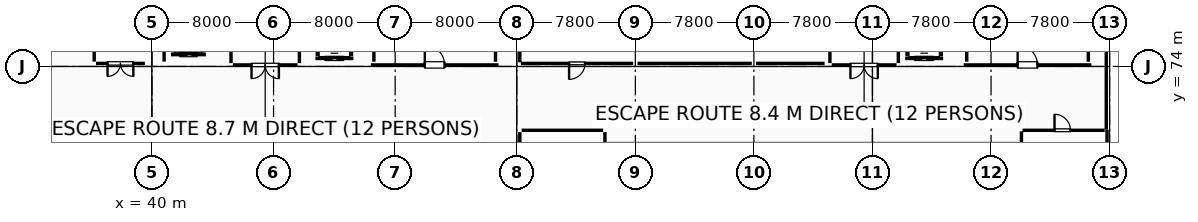
"""IFC4 building model, lengths in metres.
Left out: names, types, materials, properties, quantities, classifications, styles, units other than length and angle.
Written with IfcOpenShell. Run it as: python <this file> out.ifc"""

import sys

from ifc_helpers import new_model, si_unit, direction, frame, frame_2d, origin, origin_2d, place, context, subcontext, project, spatial, rectangle, i_section, extrude, element, fill, save


model = new_model("IFC4")
c1 = context("Model", 3, precision=1e-05, world=origin(), true_north=direction((0.0, 1.0)))
c2 = subcontext(c1, "Body", "Model", "MODEL_VIEW")
j1 = project(units=[si_unit("LENGTHUNIT", "METRE"), si_unit("PLANEANGLEUNIT", "RADIAN")], contexts=[c1])
p1 = place(None, origin())
s1 = spatial("IfcSite", under=j1, at=p1, CompositionType="ELEMENT")
p2 = place(p1, origin())
s2 = spatial("IfcBuilding", under=s1, at=p2, CompositionType="ELEMENT")
p3 = place(p2, frame((0.0, 0.0, 15.0)))
s3 = spatial("IfcBuildingStorey", under=s2, at=p3, CompositionType="ELEMENT", Elevation=15.0)
p4 = place(p3, frame((40.0, 74.0, 0.0), z_axis=(0.0, 0.0, 1.0), x_axis=(1.0, 0.0, 0.0)))
e1 = element("IfcColumn", 1, at=p4, inside=s3, PredefinedType="COLUMN", context=c2, shape_type="SweptSolid", body=[
    extrude(rectangle(XDim=0.9, YDim=0.9, at=origin_2d()), origin(), (0.0, 0.0, 1.0), 4.8),
])
for number, where, z_axis, x_axis in (
    (2, (64.0, 74.0, 0.0), (0.0, 0.0, 1.0), (1.0, 0.0, 0.0)),
    (3, (71.8, 74.0, 0.0), (0.0, 0.0, 1.0), (1.0, 0.0, 0.0)),
    (4, (79.6, 74.0, 0.0), (0.0, 0.0, 1.0), (1.0, 0.0, 0.0)),
    (5, (103.0, 74.0, 0.0), (0.0, 0.0, 1.0), (1.0, 0.0, 0.0)),
):
    element("IfcColumn", number, at=place(p3, frame(where, z_axis=z_axis, x_axis=x_axis)), inside=s3, PredefinedType="COLUMN", context=c2, shape_type="SweptSolid", body=[
        extrude(i_section(OverallWidth=0.25, OverallDepth=0.45, WebThickness=0.011, FlangeThickness=0.014, FilletRadius=0.015, at=origin_2d()), origin(), (0.0, 0.0, 1.0), 4.8),
    ])
p5 = place(p3, frame((102.78, 82.767, 0.0), z_axis=(0.0, 0.0, 1.0), x_axis=(0.0, -1.0, 0.0)))
e6 = element("IfcWall", 6, at=p5, inside=s3, PredefinedType="STANDARD", context=c2, shape_type="SweptSolid", body=[
    extrude(rectangle(XDim=9.0, YDim=0.4, at=frame_2d((4.5, 0.0))), origin(), (0.0, 0.0, 1.0), 3.885),
])
p6 = place(p3, frame((102.78, 73.767, 0.0), z_axis=(0.0, 0.0, 1.0), x_axis=(0.0, -1.0, 0.0)))
e7 = element("IfcWall", 7, at=p6, inside=s3, PredefinedType="STANDARD", context=c2, shape_type="SweptSolid", body=[
    extrude(rectangle(XDim=3.923, YDim=0.4, at=frame_2d((1.961, 0.0))), origin(), (0.0, 0.0, 1.0), 3.785),
])
p7 = place(p3, frame((102.83, 69.84, 0.0), z_axis=(0.0, 0.0, 1.0), x_axis=(0.0, -1.0, 0.0)))
e8 = element("IfcWall", 8, at=p7, inside=s3, PredefinedType="STANDARD", context=c2, shape_type="SweptSolid", body=[
    extrude(rectangle(XDim=5.073, YDim=0.3, at=frame_2d((2.537, 0.0))), origin(), (0.0, 0.0, 1.0), 3.785),
])
p8 = place(p3, frame((39.76, 69.88, 0.0), z_axis=(0.0, 0.0, 1.0), x_axis=(0.0, -1.0, 0.0)))
e9 = element("IfcWall", 9, at=p8, inside=s3, PredefinedType="PARAPET", context=c2, shape_type="SweptSolid", body=[
    extrude(rectangle(XDim=4.42, YDim=0.18, at=frame_2d((2.21, 0.0))), origin(), (0.0, 0.0, 1.0), 0.88),
])
p9 = place(p3, frame((54.4, 74.1, 0.0), z_axis=(0.0, 0.0, 1.0), x_axis=(1.0, 0.0, 0.0)))
e10 = element("IfcWall", 10, at=p9, inside=s3, PredefinedType="SHEAR", context=c2, shape_type="SweptSolid", body=[
    extrude(rectangle(XDim=8.4, YDim=0.4, at=frame_2d((4.2, 0.0))), origin(), (0.0, 0.0, 1.0), 4.55),
])
p10 = place(p9, frame((3.55, 0.0, 0.0)))
e11 = element("IfcOpeningElement", 11, at=p10, cuts=e10, PredefinedType="OPENING", context=c2, shape_type="SweptSolid", body=[
    extrude(rectangle(XDim=1.3, YDim=2.15, at=frame_2d((0.65, 1.075))), frame((0.0, 0.21, 0.0), z_axis=(0.0, -1.0, 0.0), x_axis=(1.0, 0.0, 0.0)), (0.0, 0.0, 1.0), 0.42),
])
for number, where, z_axis, x_axis in (
    (12, (62.6, 74.31, 0.0), (0.0, 0.0, 1.0), (0.0, 1.0, 0.0)),
    (13, (54.6, 82.69, 0.0), (0.0, 0.0, 1.0), (0.0, -1.0, 0.0)),
):
    element("IfcWall", number, at=place(p3, frame(where, z_axis=z_axis, x_axis=x_axis)), inside=s3, PredefinedType="SHEAR", context=c2, shape_type="SweptSolid", body=[
        extrude(rectangle(XDim=8.38, YDim=0.4, at=frame_2d((4.19, 0.0))), origin(), (0.0, 0.0, 1.0), 4.55),
    ])
p11 = place(p3, frame((50.75, 74.525, 0.0), z_axis=(0.0, 0.0, 1.0), x_axis=(1.0, 0.0, 0.0)))
e14 = element("IfcWall", 14, at=p11, inside=s3, PredefinedType="STANDARD", context=c2, shape_type="SweptSolid", body=[
    extrude(rectangle(XDim=2.5, YDim=0.25, at=frame_2d((1.25, 0.0))), origin(), (0.0, 0.0, 1.0), 4.54),
])
p12 = place(p11, frame((0.65, 0.0, 0.0)))
e15 = element("IfcOpeningElement", 15, at=p12, cuts=e14, PredefinedType="OPENING", context=c2, shape_type="SweptSolid", body=[
    extrude(rectangle(XDim=1.2, YDim=2.05, at=frame_2d((0.6, 1.025))), frame((0.0, 0.135, 0.0), z_axis=(0.0, -1.0, 0.0), x_axis=(1.0, 0.0, 0.0)), (0.0, 0.0, 1.0), 0.27),
])
for number, where, z_axis, x_axis in (
    (16, (53.125, 74.66, 0.0), (0.0, 0.0, 1.0), (0.0, 1.0, 0.0)),
    (17, (50.875, 76.94, 0.0), (0.0, 0.0, 1.0), (0.0, -1.0, 0.0)),
):
    element("IfcWall", number, at=place(p3, frame(where, z_axis=z_axis, x_axis=x_axis)), inside=s3, PredefinedType="STANDARD", context=c2, shape_type="SweptSolid", body=[
        extrude(rectangle(XDim=2.28, YDim=0.25, at=frame_2d((1.14, 0.0))), origin(), (0.0, 0.0, 1.0), 4.54),
    ])
p13 = place(p3, frame((41.25, 74.775, 0.0), z_axis=(0.0, 0.0, 1.0), x_axis=(1.0, 0.0, 0.0)))
e18 = element("IfcWall", 18, at=p13, inside=s3, PredefinedType="STANDARD", context=c2, shape_type="SweptSolid", body=[
    extrude(rectangle(XDim=2.3, YDim=0.25, at=frame_2d((1.15, 0.0))), origin(), (0.0, 0.0, 1.0), 4.54),
])
p14 = place(p13, frame((0.6, 0.0, 0.0)))
e19 = element("IfcOpeningElement", 19, at=p14, cuts=e18, PredefinedType="OPENING", context=c2, shape_type="SweptSolid", body=[
    extrude(rectangle(XDim=1.1, YDim=2.15, at=frame_2d((0.55, 1.075))), frame((0.0, 0.135, 0.0), z_axis=(0.0, -1.0, 0.0), x_axis=(1.0, 0.0, 0.0)), (0.0, 0.0, 1.0), 0.27),
])
for number, where, z_axis, x_axis in (
    (20, (43.425, 74.91, 0.0), (0.0, 0.0, 1.0), (0.0, 1.0, 0.0)),
    (21, (41.375, 77.49, 0.0), (0.0, 0.0, 1.0), (0.0, -1.0, 0.0)),
):
    element("IfcWall", number, at=place(p3, frame(where, z_axis=z_axis, x_axis=x_axis)), inside=s3, PredefinedType="STANDARD", context=c2, shape_type="SweptSolid", body=[
        extrude(rectangle(XDim=2.58, YDim=0.25, at=frame_2d((1.29, 0.0))), origin(), (0.0, 0.0, 1.0), 4.54),
    ])
p15 = place(p3, frame((93.4, 74.1, 0.0), z_axis=(0.0, 0.0, 1.0), x_axis=(1.0, 0.0, 0.0)))
e22 = element("IfcWall", 22, at=p15, inside=s3, PredefinedType="SHEAR", context=c2, shape_type="SweptSolid", body=[
    extrude(rectangle(XDim=8.4, YDim=0.4, at=frame_2d((4.2, 0.0))), origin(), (0.0, 0.0, 1.0), 4.55),
])
p16 = place(p15, frame((3.55, 0.0, 0.0)))
e23 = element("IfcOpeningElement", 23, at=p16, cuts=e22, PredefinedType="OPENING", context=c2, shape_type="SweptSolid", body=[
    extrude(rectangle(XDim=1.3, YDim=2.15, at=frame_2d((0.65, 1.075))), frame((0.0, 0.21, 0.0), z_axis=(0.0, -1.0, 0.0), x_axis=(1.0, 0.0, 0.0)), (0.0, 0.0, 1.0), 0.42),
])
for number, where, z_axis, x_axis in (
    (24, (101.6, 74.31, 0.0), (0.0, 0.0, 1.0), (0.0, 1.0, 0.0)),
    (25, (93.6, 82.69, 0.0), (0.0, 0.0, 1.0), (0.0, -1.0, 0.0)),
):
    element("IfcWall", number, at=place(p3, frame(where, z_axis=z_axis, x_axis=x_axis)), inside=s3, PredefinedType="SHEAR", context=c2, shape_type="SweptSolid", body=[
        extrude(rectangle(XDim=8.38, YDim=0.4, at=frame_2d((4.19, 0.0))), origin(), (0.0, 0.0, 1.0), 4.55),
    ])
p17 = place(p3, frame((89.55, 74.525, 0.0), z_axis=(0.0, 0.0, 1.0), x_axis=(1.0, 0.0, 0.0)))
e26 = element("IfcWall", 26, at=p17, inside=s3, PredefinedType="STANDARD", context=c2, shape_type="SweptSolid", body=[
    extrude(rectangle(XDim=2.5, YDim=0.25, at=frame_2d((1.25, 0.0))), origin(), (0.0, 0.0, 1.0), 4.54),
])
p18 = place(p17, frame((0.65, 0.0, 0.0)))
e27 = element("IfcOpeningElement", 27, at=p18, cuts=e26, PredefinedType="OPENING", context=c2, shape_type="SweptSolid", body=[
    extrude(rectangle(XDim=1.2, YDim=2.05, at=frame_2d((0.6, 1.025))), frame((0.0, 0.135, 0.0), z_axis=(0.0, -1.0, 0.0), x_axis=(1.0, 0.0, 0.0)), (0.0, 0.0, 1.0), 0.27),
])
for number, where, z_axis, x_axis in (
    (28, (91.925, 74.66, 0.0), (0.0, 0.0, 1.0), (0.0, 1.0, 0.0)),
    (29, (89.675, 76.94, 0.0), (0.0, 0.0, 1.0), (0.0, -1.0, 0.0)),
):
    element("IfcWall", number, at=place(p3, frame(where, z_axis=z_axis, x_axis=x_axis)), inside=s3, PredefinedType="STANDARD", context=c2, shape_type="SweptSolid", body=[
        extrude(rectangle(XDim=2.28, YDim=0.25, at=frame_2d((1.14, 0.0))), origin(), (0.0, 0.0, 1.0), 4.54),
    ])
for number, where, z_axis, x_axis in (
    (30, (45.2, 74.22, 0.0), (0.0, 0.0, 1.0), (0.0, 1.0, 0.0)),
    (31, (49.7, 77.58, 0.0), (0.0, 0.0, 1.0), (0.0, -1.0, 0.0)),
):
    element("IfcWall", number, at=place(p3, frame(where, z_axis=z_axis, x_axis=x_axis)), inside=s3, PredefinedType="PARTITIONING", context=c2, shape_type="SweptSolid", body=[
        extrude(rectangle(XDim=3.36, YDim=0.2, at=frame_2d((1.68, 0.0))), origin(), (0.0, 0.0, 1.0), 4.54),
    ])
p19 = place(p3, frame((49.58, 74.1, 0.0), z_axis=(0.0, 0.0, 1.0), x_axis=(-1.0, 0.0, 0.0)))
e32 = element("IfcWall", 32, at=p19, inside=s3, PredefinedType="PARTITIONING", context=c2, shape_type="SweptSolid", body=[
    extrude(rectangle(XDim=4.26, YDim=0.2, at=frame_2d((2.13, 0.0))), origin(), (0.0, 0.0, 1.0), 4.54),
])
p20 = place(p19, frame((1.23, 0.0, 0.0)))
e33 = element("IfcOpeningElement", 33, at=p20, cuts=e32, PredefinedType="OPENING", context=c2, shape_type="SweptSolid", body=[
    extrude(rectangle(XDim=1.8, YDim=2.15, at=frame_2d((0.9, 1.075))), frame((0.0, 0.11, 0.0), z_axis=(0.0, -1.0, 0.0), x_axis=(1.0, 0.0, 0.0)), (0.0, 0.0, 1.0), 0.22),
])
for number, where, z_axis, x_axis in (
    (34, (84.6, 74.22, 0.0), (0.0, 0.0, 1.0), (0.0, 1.0, 0.0)),
    (35, (89.1, 77.58, 0.0), (0.0, 0.0, 1.0), (0.0, -1.0, 0.0)),
):
    element("IfcWall", number, at=place(p3, frame(where, z_axis=z_axis, x_axis=x_axis)), inside=s3, PredefinedType="PARTITIONING", context=c2, shape_type="SweptSolid", body=[
        extrude(rectangle(XDim=3.36, YDim=0.2, at=frame_2d((1.68, 0.0))), origin(), (0.0, 0.0, 1.0), 4.54),
    ])
p21 = place(p3, frame((88.98, 74.1, 0.0), z_axis=(0.0, 0.0, 1.0), x_axis=(-1.0, 0.0, 0.0)))
e36 = element("IfcWall", 36, at=p21, inside=s3, PredefinedType="PARTITIONING", context=c2, shape_type="SweptSolid", body=[
    extrude(rectangle(XDim=4.26, YDim=0.2, at=frame_2d((2.13, 0.0))), origin(), (0.0, 0.0, 1.0), 4.54),
])
p22 = place(p21, frame((1.23, 0.0, 0.0)))
e37 = element("IfcOpeningElement", 37, at=p22, cuts=e36, PredefinedType="OPENING", context=c2, shape_type="SweptSolid", body=[
    extrude(rectangle(XDim=1.8, YDim=2.15, at=frame_2d((0.9, 1.075))), frame((0.0, 0.11, 0.0), z_axis=(0.0, -1.0, 0.0), x_axis=(1.0, 0.0, 0.0)), (0.0, 0.0, 1.0), 0.22),
])
p23 = place(p3, frame((40.8, 82.666, 0.0), z_axis=(0.0, 0.0, 1.0), x_axis=(0.0, -1.0, 0.0)))
e38 = element("IfcWall", 38, at=p23, inside=s3, PredefinedType="PARTITIONING", context=c2, shape_type="SweptSolid", body=[
    extrude(rectangle(XDim=8.346, YDim=0.2, at=frame_2d((4.173, 0.0))), origin(), (0.0, 0.0, 1.0), 4.54),
])
p24 = place(p3, frame((39.535, 74.2, 0.0), z_axis=(0.0, 0.0, 1.0), x_axis=(-1.0, 0.0, 0.0)))
e39 = element("IfcWall", 39, at=p24, inside=s3, PredefinedType="PARTITIONING", context=c2, shape_type="SweptSolid", body=[
    extrude(rectangle(XDim=3.215, YDim=0.2, at=frame_2d((1.607, 0.0))), origin(), (0.0, 0.0, 1.0), 4.54),
])
p25 = place(p24, frame((0.757, 0.0, 0.0)))
e40 = element("IfcOpeningElement", 40, at=p25, cuts=e39, PredefinedType="OPENING", context=c2, shape_type="SweptSolid", body=[
    extrude(rectangle(XDim=1.7, YDim=2.25, at=frame_2d((0.85, 1.125))), frame((0.0, 0.11, 0.0), z_axis=(0.0, -1.0, 0.0), x_axis=(1.0, 0.0, 0.0)), (0.0, 0.0, 1.0), 0.22),
])
p26 = place(p3, frame((36.2, 74.32, 0.0), z_axis=(0.0, 0.0, 1.0), x_axis=(0.0, 1.0, 0.0)))
e41 = element("IfcWall", 41, at=p26, inside=s3, PredefinedType="PARTITIONING", context=c2, shape_type="SweptSolid", body=[
    extrude(rectangle(XDim=8.346, YDim=0.2, at=frame_2d((4.173, 0.0))), origin(), (0.0, 0.0, 1.0), 4.54),
])
p27 = place(p3, frame((64.32, 69.8, 0.0), z_axis=(0.0, 0.0, 1.0), x_axis=(1.0, 0.0, 0.0)))
e42 = element("IfcWall", 42, at=p27, inside=s3, PredefinedType="PARTITIONING", context=c2, shape_type="SweptSolid", body=[
    extrude(rectangle(XDim=5.36, YDim=0.2, at=frame_2d((2.68, 0.0))), origin(), (0.0, 0.0, 1.0), 4.54),
])
p28 = place(p3, frame((69.8, 69.68, 0.0), z_axis=(0.0, 0.0, 1.0), x_axis=(0.0, -1.0, 0.0)))
e43 = element("IfcWall", 43, at=p28, inside=s3, PredefinedType="PARTITIONING", context=c2, shape_type="SweptSolid", body=[
    extrude(rectangle(XDim=22.16, YDim=0.2, at=frame_2d((11.08, 0.0))), origin(), (0.0, 0.0, 1.0), 4.54),
])
p29 = place(p3, frame((64.2, 65.24, 0.0), z_axis=(0.0, 0.0, 1.0), x_axis=(0.0, 1.0, 0.0)))
e44 = element("IfcWall", 44, at=p29, inside=s3, PredefinedType="PARTITIONING", context=c2, shape_type="SweptSolid", body=[
    extrude(rectangle(XDim=4.44, YDim=0.2, at=frame_2d((2.22, 0.0))), origin(), (0.0, 0.0, 1.0), 3.88),
])
p30 = place(p29, frame((1.745, 0.0, 0.0)))
e45 = element("IfcOpeningElement", 45, at=p30, cuts=e44, PredefinedType="OPENING", context=c2, shape_type="SweptSolid", body=[
    extrude(rectangle(XDim=0.95, YDim=2.15, at=frame_2d((0.475, 1.075))), frame((0.0, 0.11, 0.0), z_axis=(0.0, -1.0, 0.0), x_axis=(1.0, 0.0, 0.0)), (0.0, 0.0, 1.0), 0.22),
])
p31 = place(p3, frame((97.27, 69.8, 0.0), z_axis=(0.0, 0.0, 1.0), x_axis=(1.0, 0.0, 0.0)))
e46 = element("IfcWall", 46, at=p31, inside=s3, PredefinedType="PARTITIONING", context=c2, shape_type="SweptSolid", body=[
    extrude(rectangle(XDim=5.406, YDim=0.1, at=frame_2d((2.703, 0.0))), origin(), (0.0, 0.0, 1.0), 4.54),
])
p32 = place(p31, frame((2.105, 0.0, 0.0)))
e47 = element("IfcOpeningElement", 47, at=p32, cuts=e46, PredefinedType="OPENING", context=c2, shape_type="SweptSolid", body=[
    extrude(rectangle(XDim=1.05, YDim=2.15, at=frame_2d((0.525, 1.075))), frame((0.0, 0.06, 0.0), z_axis=(0.0, -1.0, 0.0), x_axis=(1.0, 0.0, 0.0)), (0.0, 0.0, 1.0), 0.12),
])
p33 = place(p3, frame((97.2, 47.47, 0.0), z_axis=(0.0, 0.0, 1.0), x_axis=(0.0, 1.0, 0.0)))
e48 = element("IfcWall", 48, at=p33, inside=s3, PredefinedType="PARTITIONING", context=c2, shape_type="SweptSolid", body=[
    extrude(rectangle(XDim=22.26, YDim=0.1, at=frame_2d((11.13, 0.0))), origin(), (0.0, 0.0, 1.0), 4.54),
])
p34 = place(p3, frame((64.2, 74.27, 0.0), z_axis=(0.0, 0.0, 1.0), x_axis=(0.0, 1.0, 0.0)))
e49 = element("IfcWall", 49, at=p34, inside=s3, PredefinedType="PARTITIONING", context=c2, shape_type="SweptSolid", body=[
    extrude(rectangle(XDim=8.501, YDim=0.1, at=frame_2d((4.25, 0.0))), origin(), (0.0, 0.0, 1.0), 4.08),
])
p35 = place(p3, frame((84.25, 74.2, 0.0), z_axis=(0.0, 0.0, 1.0), x_axis=(-1.0, 0.0, 0.0)))
e50 = element("IfcWall", 50, at=p35, inside=s3, PredefinedType="PARTITIONING", context=c2, shape_type="SweptSolid", body=[
    extrude(rectangle(XDim=4.51, YDim=0.1, at=frame_2d((2.255, 0.0))), origin(), (0.0, 0.0, 1.0), 4.54),
])
p36 = place(p3, frame((79.46, 74.2, 0.0), z_axis=(0.0, 0.0, 1.0), x_axis=(-1.0, 0.0, 0.0)))
e51 = element("IfcWall", 51, at=p36, inside=s3, PredefinedType="PARTITIONING", context=c2, shape_type="SweptSolid", body=[
    extrude(rectangle(XDim=7.52, YDim=0.1, at=frame_2d((3.76, 0.0))), origin(), (0.0, 0.0, 1.0), 4.08),
])
p37 = place(p3, frame((71.66, 74.2, 0.0), z_axis=(0.0, 0.0, 1.0), x_axis=(-1.0, 0.0, 0.0)))
e52 = element("IfcWall", 52, at=p37, inside=s3, PredefinedType="PARTITIONING", context=c2, shape_type="SweptSolid", body=[
    extrude(rectangle(XDim=7.39, YDim=0.1, at=frame_2d((3.695, 0.0))), origin(), (0.0, 0.0, 1.0), 4.03),
])
p38 = place(p37, frame((3.17, 0.0, 0.0)))
e53 = element("IfcOpeningElement", 53, at=p38, cuts=e52, PredefinedType="OPENING", context=c2, shape_type="SweptSolid", body=[
    extrude(rectangle(XDim=1.05, YDim=2.15, at=frame_2d((0.525, 1.075))), frame((0.0, 0.06, 0.0), z_axis=(0.0, -1.0, 0.0), x_axis=(1.0, 0.0, 0.0)), (0.0, 0.0, 1.0), 0.12),
])
p39 = place(p10, origin())
e54 = element("IfcDoor", 54, at=p39, inside=s3, OperationType="SINGLE_SWING_LEFT", PredefinedType="DOOR", context=c2, shape_type="SweptSolid", body=[
    extrude(rectangle(XDim=1.3, YDim=2.15, at=frame_2d((0.65, 1.075))), frame((0.0, 0.025, 0.0), z_axis=(0.0, -1.0, 0.0), x_axis=(1.0, 0.0, 0.0)), (0.0, 0.0, 1.0), 0.05),
])
fill(e11, e54)
p40 = place(p12, origin())
e55 = element("IfcDoor", 55, at=p40, inside=s3, OperationType="DOUBLE_DOOR_SLIDING", PredefinedType="DOOR", context=c2, shape_type="SweptSolid", body=[
    extrude(rectangle(XDim=1.2, YDim=2.05, at=frame_2d((0.6, 1.025))), frame((0.0, 0.025, 0.0), z_axis=(0.0, -1.0, 0.0), x_axis=(1.0, 0.0, 0.0)), (0.0, 0.0, 1.0), 0.05),
])
fill(e15, e55)
p41 = place(p14, origin())
e56 = element("IfcDoor", 56, at=p41, inside=s3, OperationType="DOUBLE_DOOR_SLIDING", PredefinedType="DOOR", context=c2, shape_type="SweptSolid", body=[
    extrude(rectangle(XDim=1.1, YDim=2.15, at=frame_2d((0.55, 1.075))), frame((0.0, 0.025, 0.0), z_axis=(0.0, -1.0, 0.0), x_axis=(1.0, 0.0, 0.0)), (0.0, 0.0, 1.0), 0.05),
])
fill(e19, e56)
p42 = place(p16, origin())
e57 = element("IfcDoor", 57, at=p42, inside=s3, OperationType="SINGLE_SWING_LEFT", PredefinedType="DOOR", context=c2, shape_type="SweptSolid", body=[
    extrude(rectangle(XDim=1.3, YDim=2.15, at=frame_2d((0.65, 1.075))), frame((0.0, 0.025, 0.0), z_axis=(0.0, -1.0, 0.0), x_axis=(1.0, 0.0, 0.0)), (0.0, 0.0, 1.0), 0.05),
])
fill(e23, e57)
p43 = place(p18, origin())
e58 = element("IfcDoor", 58, at=p43, inside=s3, OperationType="DOUBLE_DOOR_SLIDING", PredefinedType="DOOR", context=c2, shape_type="SweptSolid", body=[
    extrude(rectangle(XDim=1.2, YDim=2.05, at=frame_2d((0.6, 1.025))), frame((0.0, 0.025, 0.0), z_axis=(0.0, -1.0, 0.0), x_axis=(1.0, 0.0, 0.0)), (0.0, 0.0, 1.0), 0.05),
])
fill(e27, e58)
p44 = place(p20, origin())
e59 = element("IfcDoor", 59, at=p44, inside=s3, OperationType="DOUBLE_DOOR_SINGLE_SWING", PredefinedType="DOOR", context=c2, shape_type="SweptSolid", body=[
    extrude(rectangle(XDim=1.8, YDim=2.15, at=frame_2d((0.9, 1.075))), frame((0.0, 0.025, 0.0), z_axis=(0.0, -1.0, 0.0), x_axis=(1.0, 0.0, 0.0)), (0.0, 0.0, 1.0), 0.05),
])
fill(e33, e59)
p45 = place(p22, origin())
e60 = element("IfcDoor", 60, at=p45, inside=s3, OperationType="DOUBLE_DOOR_SINGLE_SWING", PredefinedType="DOOR", context=c2, shape_type="SweptSolid", body=[
    extrude(rectangle(XDim=1.8, YDim=2.15, at=frame_2d((0.9, 1.075))), frame((0.0, 0.025, 0.0), z_axis=(0.0, -1.0, 0.0), x_axis=(1.0, 0.0, 0.0)), (0.0, 0.0, 1.0), 0.05),
])
fill(e37, e60)
p46 = place(p25, origin())
e61 = element("IfcDoor", 61, at=p46, inside=s3, OperationType="DOUBLE_DOOR_SINGLE_SWING", PredefinedType="DOOR", context=c2, shape_type="SweptSolid", body=[
    extrude(rectangle(XDim=1.7, YDim=2.25, at=frame_2d((0.85, 1.125))), frame((0.0, 0.025, 0.0), z_axis=(0.0, -1.0, 0.0), x_axis=(1.0, 0.0, 0.0)), (0.0, 0.0, 1.0), 0.05),
])
fill(e40, e61)
p47 = place(p32, origin())
e62 = element("IfcDoor", 62, at=p47, inside=s3, OperationType="SINGLE_SWING_LEFT", PredefinedType="DOOR", context=c2, shape_type="SweptSolid", body=[
    extrude(rectangle(XDim=1.05, YDim=2.15, at=frame_2d((0.525, 1.075))), frame((0.0, 0.025, 0.0), z_axis=(0.0, -1.0, 0.0), x_axis=(1.0, 0.0, 0.0)), (0.0, 0.0, 1.0), 0.05),
])
fill(e47, e62)
p48 = place(p38, origin())
e63 = element("IfcDoor", 63, at=p48, inside=s3, OperationType="SINGLE_SWING_RIGHT", PredefinedType="DOOR", context=c2, shape_type="SweptSolid", body=[
    extrude(rectangle(XDim=1.05, YDim=2.15, at=frame_2d((0.525, 1.075))), frame((0.0, 0.025, 0.0), z_axis=(0.0, -1.0, 0.0), x_axis=(1.0, 0.0, 0.0)), (0.0, 0.0, 1.0), 0.05),
])
fill(e53, e63)
save(model, sys.argv[1])
